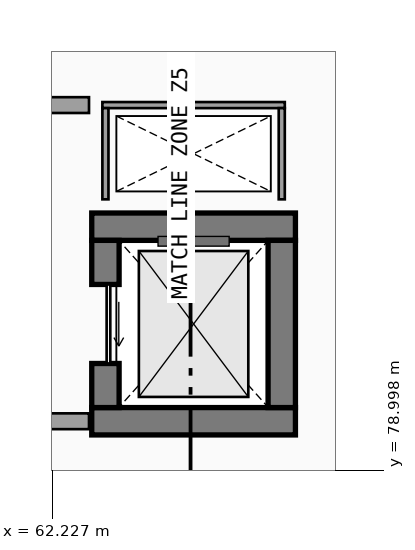
"""IFC4 building model, lengths in metres.
Left out: names, types, materials, properties, quantities, classifications, styles, units other than length and angle.
Written with IfcOpenShell. Run it as: python <this file> out.ifc"""

import sys

from ifc_helpers import new_model, si_unit, direction, frame, frame_2d, origin, place, context, subcontext, project, spatial, rectangle, extrude, element, fill, save


model = new_model("IFC4")
c1 = context("Model", 3, precision=1e-05, world=origin(), true_north=direction((0.0, 1.0)))
c2 = subcontext(c1, "Body", "Model", "MODEL_VIEW")
j1 = project(units=[si_unit("LENGTHUNIT", "METRE"), si_unit("PLANEANGLEUNIT", "RADIAN")], contexts=[c1])
p1 = place(None, origin())
s1 = spatial("IfcSite", under=j1, at=p1, CompositionType="ELEMENT")
p2 = place(p1, origin())
s2 = spatial("IfcBuilding", under=s1, at=p2, CompositionType="ELEMENT")
p3 = place(p2, frame((0.0, 0.0, 14.1)))
s3 = spatial("IfcBuildingStorey", under=s2, at=p3, CompositionType="ELEMENT", Elevation=14.1)
for number, where, z_axis, x_axis in (
    (1, (62.875, 79.8, 0.0), (0.0, 0.0, 1.0), (1.0, 0.0, 0.0)),
    (2, (66.225, 83.0, 0.0), (0.0, 0.0, 1.0), (-1.0, 0.0, 0.0)),
):
    element("IfcWall", number, at=place(p3, frame(where, z_axis=z_axis, x_axis=x_axis)), inside=s3, PredefinedType="SHEAR", context=c2, shape_type="SweptSolid", body=[
        extrude(rectangle(XDim=3.35, YDim=0.45, at=frame_2d((1.675, 0.0))), origin(), (0.0, 0.0, 1.0), 4.24),
    ])
p4 = place(p3, frame((63.1, 82.775, 0.0), z_axis=(0.0, 0.0, 1.0), x_axis=(0.0, -1.0, 0.0)))
e3 = element("IfcWall", 3, at=p4, inside=s3, PredefinedType="SHEAR", context=c2, shape_type="SweptSolid", body=[
    extrude(rectangle(XDim=2.75, YDim=0.45, at=frame_2d((1.375, 0.0))), origin(), (0.0, 0.0, 1.0), 4.24),
])
p5 = place(p4, frame((0.725, 0.0, 0.0), z_axis=(0.0, 0.0, 1.0), x_axis=(1.0, 0.0, 0.0)))
e4 = element("IfcOpeningElement", 4, at=p5, cuts=e3, PredefinedType="OPENING", context=c2, shape_type="SweptSolid", body=[
    extrude(rectangle(XDim=1.3, YDim=2.25, at=frame_2d((0.65, 1.125))), frame((0.0, 0.235, 0.0), z_axis=(0.0, -1.0, 0.0), x_axis=(1.0, 0.0, 0.0)), (0.0, 0.0, 1.0), 0.47),
])
p6 = place(p3, frame((66.0, 80.025, 0.0), z_axis=(0.0, 0.0, 1.0), x_axis=(0.0, 1.0, 0.0)))
e5 = element("IfcWall", 5, at=p6, inside=s3, PredefinedType="SHEAR", context=c2, shape_type="SweptSolid", body=[
    extrude(rectangle(XDim=2.75, YDim=0.45, at=frame_2d((1.375, 0.0))), origin(), (0.0, 0.0, 1.0), 4.24),
])
p7 = place(p3, frame((66.05, 85.0, 0.0), z_axis=(0.0, 0.0, 1.0), x_axis=(-1.0, 0.0, 0.0)))
e6 = element("IfcWall", 6, at=p7, inside=s3, PredefinedType="PARTITIONING", context=c2, shape_type="SweptSolid", body=[
    extrude(rectangle(XDim=3.0, YDim=0.1, at=frame_2d((1.5, 0.0))), origin(), (0.0, 0.0, 1.0), 4.24),
])
for number, where, z_axis, x_axis in (
    (7, (63.1, 84.95, 0.0), (0.0, 0.0, 1.0), (0.0, -1.0, 0.0)),
    (8, (66.0, 83.45, 0.0), (0.0, 0.0, 1.0), (0.0, 1.0, 0.0)),
):
    element("IfcWall", number, at=place(p3, frame(where, z_axis=z_axis, x_axis=x_axis)), inside=s3, PredefinedType="PARTITIONING", context=c2, shape_type="SweptSolid", body=[
        extrude(rectangle(XDim=1.5, YDim=0.1, at=frame_2d((0.75, 0.0))), origin(), (0.0, 0.0, 1.0), 4.24),
    ])
p8 = place(p3, frame((59.07, 79.8, 0.0), z_axis=(0.0, 0.0, 1.0), x_axis=(1.0, 0.0, 0.0)))
e9 = element("IfcWall", 9, at=p8, inside=s3, PredefinedType="SOLIDWALL", context=c2, shape_type="SweptSolid", body=[
    extrude(rectangle(XDim=3.76, YDim=0.26, at=frame_2d((1.88, 0.0))), origin(), (0.0, 0.0, 1.0), 4.24),
])
p9 = place(p3, frame((62.83, 85.0, 0.0), z_axis=(0.0, 0.0, 1.0), x_axis=(-1.0, 0.0, 0.0)))
e10 = element("IfcWall", 10, at=p9, inside=s3, PredefinedType="SOLIDWALL", context=c2, shape_type="SweptSolid", body=[
    extrude(rectangle(XDim=3.76, YDim=0.26, at=frame_2d((1.88, 0.0))), origin(), (0.0, 0.0, 1.0), 4.24),
])
p10 = place(p9, frame((2.805, 0.0, 0.0), z_axis=(0.0, 0.0, 1.0), x_axis=(-1.0, 0.0, 0.0)))
e11 = element("IfcOpeningElement", 11, at=p10, cuts=e10, PredefinedType="OPENING", context=c2, shape_type="SweptSolid", body=[
    extrude(rectangle(XDim=1.85, YDim=2.25, at=frame_2d((0.925, 1.125))), frame((0.0, 0.14, 0.0), z_axis=(0.0, -1.0, 0.0), x_axis=(1.0, 0.0, 0.0)), (0.0, 0.0, 1.0), 0.28),
])
p11 = place(p5, origin())
e12 = element("IfcDoor", 12, at=p11, inside=s3, OperationType="SLIDING_TO_RIGHT", PredefinedType="DOOR", context=c2, shape_type="SweptSolid", body=[
    extrude(rectangle(XDim=1.3, YDim=2.25, at=frame_2d((0.65, 1.125))), frame((0.0, 0.025, 0.0), z_axis=(0.0, -1.0, 0.0), x_axis=(1.0, 0.0, 0.0)), (0.0, 0.0, 1.0), 0.05),
])
fill(e4, e12)
save(model, sys.argv[1])
